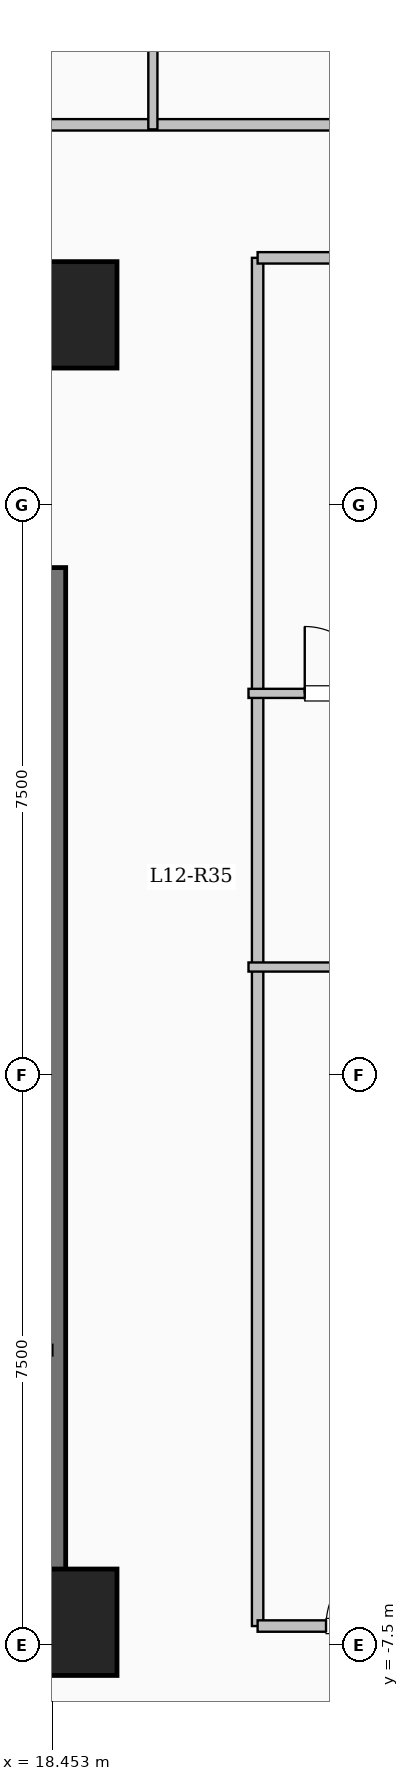
"""IFC4 building model, lengths in metres.
Left out: names, types, materials, properties, quantities, classifications, styles, units other than length and angle.
Written with IfcOpenShell. Run it as: python <this file> out.ifc"""

import sys

from ifc_helpers import new_model, si_unit, direction, frame, frame_2d, origin, origin_2d, place, context, subcontext, project, spatial, rectangle, extrude, element, fill, save


model = new_model("IFC4")
c1 = context("Model", 3, precision=1e-05, world=origin(), true_north=direction((0.0, 1.0)))
c2 = subcontext(c1, "Body", "Model", "MODEL_VIEW")
j1 = project(units=[si_unit("LENGTHUNIT", "METRE"), si_unit("PLANEANGLEUNIT", "RADIAN")], contexts=[c1])
p1 = place(None, origin())
s1 = spatial("IfcSite", under=j1, at=p1, CompositionType="ELEMENT")
p2 = place(p1, origin())
s2 = spatial("IfcBuilding", under=s1, at=p2, CompositionType="ELEMENT")
p3 = place(p2, frame((0.0, 0.0, 47.45)))
s3 = spatial("IfcBuildingStorey", under=s2, at=p3, CompositionType="ELEMENT", Elevation=47.45)
for number, where, z_axis, x_axis in (
    (1, (18.6, -7.2, 0.0), (0.0, 0.0, 1.0), (1.0, 0.0, 0.0)),
    (2, (18.6, 10.0, 0.0), (0.0, 0.0, 1.0), (1.0, 0.0, 0.0)),
):
    element("IfcColumn", number, at=place(p3, frame(where, z_axis=z_axis, x_axis=x_axis)), inside=s3, PredefinedType="COLUMN", context=c2, shape_type="SweptSolid", body=[
        extrude(rectangle(XDim=1.4, YDim=1.4, at=origin_2d()), origin(), (0.0, 0.0, 1.0), 3.35),
    ])
p4 = place(p3, frame((18.45, -7.375, 0.0), z_axis=(0.0, 0.0, 1.0), x_axis=(0.0, 1.0, 0.0)))
e3 = element("IfcWall", 3, at=p4, inside=s3, PredefinedType="SHEAR", context=c2, shape_type="SweptSolid", body=[
    extrude(rectangle(XDim=14.05, YDim=0.35, at=frame_2d((7.025, 0.0))), origin(), (0.0, 0.0, 1.0), 3.35),
])
p5 = place(p3, frame((10.075, -7.2, 0.0), z_axis=(0.0, 0.0, 1.0), x_axis=(1.0, 0.0, 0.0)))
e4 = element("IfcWall", 4, at=p5, inside=s3, PredefinedType="SHEAR", context=c2, shape_type="SweptSolid", body=[
    extrude(rectangle(XDim=8.55, YDim=0.35, at=frame_2d((4.275, 0.0))), origin(), (0.0, 0.0, 1.0), 3.35),
])
p6 = place(p3, frame((3.85, 12.5, 0.0), z_axis=(0.0, 0.0, 1.0), x_axis=(1.0, 0.0, 0.0)))
e5 = element("IfcWall", 5, at=p6, inside=s3, PredefinedType="PARTITIONING", context=c2, shape_type="SweptSolid", body=[
    extrude(rectangle(XDim=18.7, YDim=0.15, at=frame_2d((9.35, 0.0))), origin(), (0.0, 0.0, 1.0), 3.1),
])
p7 = place(p6, frame((1.6, 0.0, 0.0)))
e6 = element("IfcOpeningElement", 6, at=p7, cuts=e5, PredefinedType="OPENING", context=c2, shape_type="SweptSolid", body=[
    extrude(rectangle(XDim=0.96, YDim=2.15, at=frame_2d((0.48, 1.075))), frame((0.0, 0.085, 0.0), z_axis=(0.0, -1.0, 0.0), x_axis=(1.0, 0.0, 0.0)), (0.0, 0.0, 1.0), 0.17),
])
p8 = place(p6, frame((6.64, 0.0, 0.0)))
e7 = element("IfcOpeningElement", 7, at=p8, cuts=e5, PredefinedType="OPENING", context=c2, shape_type="SweptSolid", body=[
    extrude(rectangle(XDim=0.96, YDim=2.15, at=frame_2d((0.48, 1.075))), frame((0.0, 0.085, 0.0), z_axis=(0.0, -1.0, 0.0), x_axis=(1.0, 0.0, 0.0)), (0.0, 0.0, 1.0), 0.17),
])
p9 = place(p3, frame((21.15, -7.25, 0.0), z_axis=(0.0, 0.0, 1.0), x_axis=(0.0, 1.0, 0.0)))
e8 = element("IfcWall", 8, at=p9, inside=s3, PredefinedType="PARTITIONING", context=c2, shape_type="SweptSolid", body=[
    extrude(rectangle(XDim=18.0, YDim=0.15, at=frame_2d((9.0, 0.0))), origin(), (0.0, 0.0, 1.0), 2.585),
])
p10 = place(p3, frame((19.772, 12.44, 0.0), z_axis=(0.0, 0.0, 1.0), x_axis=(0.0, 1.0, 0.0)))
e9 = element("IfcWall", 9, at=p10, inside=s3, PredefinedType="PARTITIONING", context=c2, shape_type="SweptSolid", body=[
    extrude(rectangle(XDim=2.79, YDim=0.12, at=frame_2d((1.395, 0.0))), origin(), (0.0, 0.0, 1.0), 3.1),
])
p11 = place(p3, frame((21.15, -7.25, 0.0), z_axis=(0.0, 0.0, 1.0), x_axis=(1.0, 0.0, 0.0)))
e10 = element("IfcWall", 10, at=p11, inside=s3, PredefinedType="PARTITIONING", context=c2, shape_type="SweptSolid", body=[
    extrude(rectangle(XDim=7.53, YDim=0.15, at=frame_2d((3.765, 0.0))), origin(), (0.0, 0.0, 1.0), 3.1),
])
p12 = place(p11, frame((0.9, 0.0, 0.0)))
e11 = element("IfcOpeningElement", 11, at=p12, cuts=e10, PredefinedType="OPENING", context=c2, shape_type="SweptSolid", body=[
    extrude(rectangle(XDim=0.96, YDim=2.15, at=frame_2d((0.48, 1.075))), frame((0.0, 0.085, 0.0), z_axis=(0.0, -1.0, 0.0), x_axis=(1.0, 0.0, 0.0)), (0.0, 0.0, 1.0), 0.17),
])
p13 = place(p3, frame((21.15, 10.75, 0.0), z_axis=(0.0, 0.0, 1.0), x_axis=(1.0, 0.0, 0.0)))
e12 = element("IfcWall", 12, at=p13, inside=s3, PredefinedType="PARTITIONING", context=c2, shape_type="SweptSolid", body=[
    extrude(rectangle(XDim=7.53, YDim=0.15, at=frame_2d((3.765, 0.0))), origin(), (0.0, 0.0, 1.0), 3.1),
])
p14 = place(p3, frame((21.03, 1.42, 0.0), z_axis=(0.0, 0.0, 1.0), x_axis=(1.0, 0.0, 0.0)))
e13 = element("IfcWall", 13, at=p14, inside=s3, PredefinedType="PARTITIONING", context=c2, shape_type="SweptSolid", body=[
    extrude(rectangle(XDim=7.77, YDim=0.12, at=frame_2d((3.885, 0.0))), origin(), (0.0, 0.0, 1.0), 3.1),
])
p15 = place(p14, frame((1.615, 0.0, 0.0)))
e14 = element("IfcOpeningElement", 14, at=p15, cuts=e13, PredefinedType="OPENING", context=c2, shape_type="SweptSolid", body=[
    extrude(rectangle(XDim=0.88, YDim=2.1, at=frame_2d((0.44, 1.05))), frame((0.0, 0.07, 0.0), z_axis=(0.0, -1.0, 0.0), x_axis=(1.0, 0.0, 0.0)), (0.0, 0.0, 1.0), 0.14),
])
p16 = place(p14, frame((5.345, 0.0, 0.0)))
e15 = element("IfcOpeningElement", 15, at=p16, cuts=e13, PredefinedType="OPENING", context=c2, shape_type="SweptSolid", body=[
    extrude(rectangle(XDim=0.88, YDim=2.1, at=frame_2d((0.44, 1.05))), frame((0.0, 0.07, 0.0), z_axis=(0.0, -1.0, 0.0), x_axis=(1.0, 0.0, 0.0)), (0.0, 0.0, 1.0), 0.14),
])
p17 = place(p3, frame((21.03, 5.02, 0.0), z_axis=(0.0, 0.0, 1.0), x_axis=(1.0, 0.0, 0.0)))
e16 = element("IfcWall", 16, at=p17, inside=s3, PredefinedType="PARTITIONING", context=c2, shape_type="SweptSolid", body=[
    extrude(rectangle(XDim=7.77, YDim=0.12, at=frame_2d((3.885, 0.0))), origin(), (0.0, 0.0, 1.0), 3.1),
])
p18 = place(p17, frame((0.74, 0.0, 0.0)))
e17 = element("IfcOpeningElement", 17, at=p18, cuts=e16, PredefinedType="OPENING", context=c2, shape_type="SweptSolid", body=[
    extrude(rectangle(XDim=0.88, YDim=2.1, at=frame_2d((0.44, 1.05))), frame((0.0, 0.07, 0.0), z_axis=(0.0, -1.0, 0.0), x_axis=(1.0, 0.0, 0.0)), (0.0, 0.0, 1.0), 0.14),
])
p19 = place(p12, origin())
e18 = element("IfcDoor", 18, at=p19, inside=s3, OperationType="SINGLE_SWING_RIGHT", PredefinedType="DOOR", context=c2, shape_type="SweptSolid", body=[
    extrude(rectangle(XDim=0.96, YDim=2.15, at=frame_2d((0.48, 1.075))), frame((0.0, 0.025, 0.0), z_axis=(0.0, -1.0, 0.0), x_axis=(1.0, 0.0, 0.0)), (0.0, 0.0, 1.0), 0.05),
])
fill(e11, e18)
p20 = place(p18, origin())
e19 = element("IfcDoor", 19, at=p20, inside=s3, OperationType="SINGLE_SWING_LEFT", PredefinedType="DOOR", context=c2, shape_type="SweptSolid", body=[
    extrude(rectangle(XDim=0.88, YDim=2.1, at=frame_2d((0.44, 1.05))), frame((0.0, 0.025, 0.0), z_axis=(0.0, -1.0, 0.0), x_axis=(1.0, 0.0, 0.0)), (0.0, 0.0, 1.0), 0.05),
])
fill(e17, e19)
save(model, sys.argv[1])
